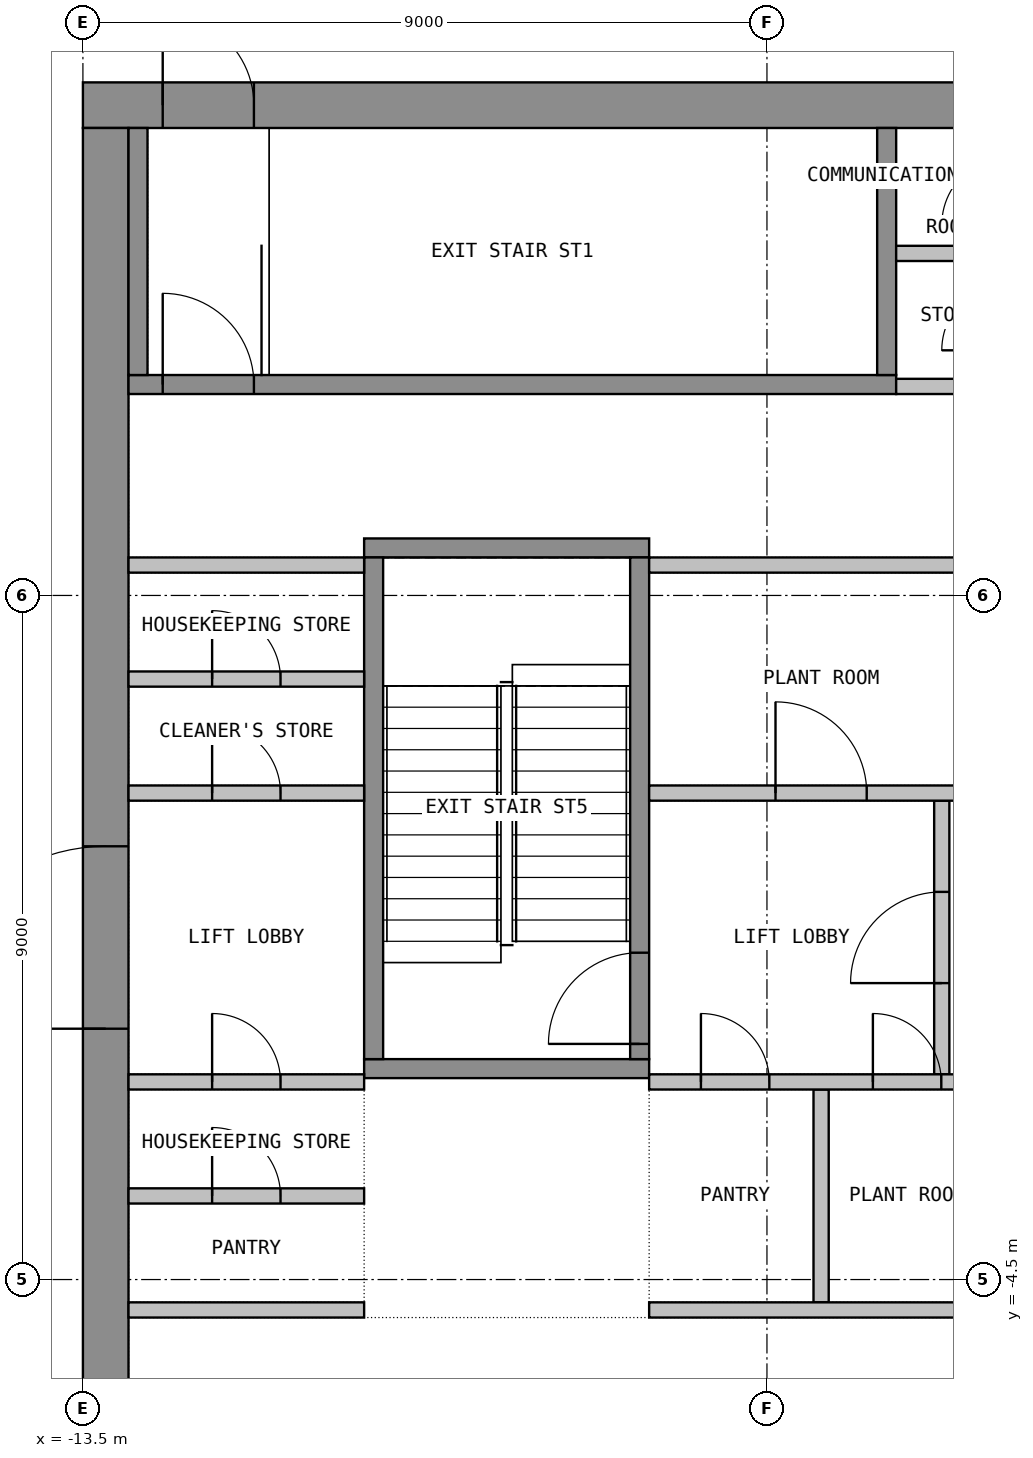
"""IFC4 building model, lengths in metres.
Left out: names, types, materials, properties, quantities, classifications, styles, units other than length and angle.
Written with IfcOpenShell. Run it as: python <this file> out.ifc"""

import sys

from ifc_helpers import new_model, si_unit, direction, frame, frame_2d, origin, place, context, subcontext, project, spatial, rectangle, extrude, element, fill, save


model = new_model("IFC4")
c1 = context("Model", 3, precision=1e-05, world=origin(), true_north=direction((0.0, 1.0)))
c2 = subcontext(c1, "Body", "Model", "MODEL_VIEW")
j1 = project(units=[si_unit("LENGTHUNIT", "METRE"), si_unit("PLANEANGLEUNIT", "RADIAN")], contexts=[c1])
p1 = place(None, origin())
s1 = spatial("IfcSite", under=j1, at=p1, CompositionType="ELEMENT")
p2 = place(p1, origin())
s2 = spatial("IfcBuilding", under=s1, at=p2, CompositionType="ELEMENT")
p3 = place(p2, frame((0.0, 0.0, 318.9)))
s3 = spatial("IfcBuildingStorey", under=s2, at=p3, CompositionType="ELEMENT", Elevation=318.9)
p4 = place(p3, frame((-13.5, 10.95, 0.0), z_axis=(0.0, 0.0, 1.0), x_axis=(1.0, 0.0, 0.0)))
e1 = element("IfcWall", 1, at=p4, inside=s3, PredefinedType="SHEAR", context=c2, shape_type="SweptSolid", body=[
    extrude(rectangle(XDim=27.0, YDim=0.6, at=frame_2d((13.5, 0.0))), origin(), (0.0, 0.0, 1.0), 3.6),
])
p5 = place(p4, frame((12.3, 0.0, 0.0)))
e2 = element("IfcOpeningElement", 2, at=p5, cuts=e1, PredefinedType="OPENING", context=c2, shape_type="SweptSolid", body=[
    extrude(rectangle(XDim=2.4, YDim=2.1, at=frame_2d((1.2, 1.05))), frame((0.0, 0.31, 0.0), z_axis=(0.0, -1.0, 0.0), x_axis=(1.0, 0.0, 0.0)), (0.0, 0.0, 1.0), 0.62),
])
p6 = place(p4, frame((1.05, 0.0, 0.0)))
e3 = element("IfcOpeningElement", 3, at=p6, cuts=e1, PredefinedType="OPENING", context=c2, shape_type="SweptSolid", body=[
    extrude(rectangle(XDim=1.2, YDim=2.1, at=frame_2d((0.6, 1.05))), frame((0.0, 0.31, 0.0), z_axis=(0.0, -1.0, 0.0), x_axis=(1.0, 0.0, 0.0)), (0.0, 0.0, 1.0), 0.62),
])
p7 = place(p4, frame((24.75, 0.0, 0.0)))
e4 = element("IfcOpeningElement", 4, at=p7, cuts=e1, PredefinedType="OPENING", context=c2, shape_type="SweptSolid", body=[
    extrude(rectangle(XDim=1.2, YDim=2.1, at=frame_2d((0.6, 1.05))), frame((0.0, 0.31, 0.0), z_axis=(0.0, -1.0, 0.0), x_axis=(1.0, 0.0, 0.0)), (0.0, 0.0, 1.0), 0.62),
])
p8 = place(p3, frame((-13.2, -10.65, 0.0), z_axis=(0.0, 0.0, 1.0), x_axis=(0.0, 1.0, 0.0)))
e5 = element("IfcWall", 5, at=p8, inside=s3, PredefinedType="SHEAR", context=c2, shape_type="SweptSolid", body=[
    extrude(rectangle(XDim=21.3, YDim=0.6, at=frame_2d((10.65, 0.0))), origin(), (0.0, 0.0, 1.0), 3.6),
])
p9 = place(p8, frame((9.45, 0.0, 0.0)))
e6 = element("IfcOpeningElement", 6, at=p9, cuts=e5, PredefinedType="OPENING", context=c2, shape_type="SweptSolid", body=[
    extrude(rectangle(XDim=2.4, YDim=2.1, at=frame_2d((1.2, 1.05))), frame((0.0, 0.31, 0.0), z_axis=(0.0, -1.0, 0.0), x_axis=(1.0, 0.0, 0.0)), (0.0, 0.0, 1.0), 0.62),
])
p10 = place(p3, frame((-2.2, -1.8, 0.0), z_axis=(0.0, 0.0, 1.0), x_axis=(0.0, 1.0, 0.0)))
e7 = element("IfcWall", 7, at=p10, inside=s3, PredefinedType="PARTITIONING", context=c2, shape_type="SweptSolid", body=[
    extrude(rectangle(XDim=3.6, YDim=0.2, at=frame_2d((1.8, 0.0))), origin(), (0.0, 0.0, 1.0), 3.6),
])
p11 = place(p10, frame((1.2, 0.0, 0.0)))
e8 = element("IfcOpeningElement", 8, at=p11, cuts=e7, PredefinedType="OPENING", context=c2, shape_type="SweptSolid", body=[
    extrude(rectangle(XDim=1.2, YDim=2.1, at=frame_2d((0.6, 1.05))), frame((0.0, 0.11, 0.0), z_axis=(0.0, -1.0, 0.0), x_axis=(1.0, 0.0, 0.0)), (0.0, 0.0, 1.0), 0.22),
])
p12 = place(p3, frame((-12.9, 7.275, 0.0), z_axis=(0.0, 0.0, 1.0), x_axis=(1.0, 0.0, 0.0)))
e9 = element("IfcWall", 9, at=p12, inside=s3, PredefinedType="SHEAR", context=c2, shape_type="SweptSolid", body=[
    extrude(rectangle(XDim=10.1, YDim=0.25, at=frame_2d((5.05, 0.0))), origin(), (0.0, 0.0, 1.0), 3.6),
])
p13 = place(p12, frame((0.45, 0.0, 0.0)))
e10 = element("IfcOpeningElement", 10, at=p13, cuts=e9, PredefinedType="OPENING", context=c2, shape_type="SweptSolid", body=[
    extrude(rectangle(XDim=1.2, YDim=2.1, at=frame_2d((0.6, 1.05))), frame((0.0, 0.135, 0.0), z_axis=(0.0, -1.0, 0.0), x_axis=(1.0, 0.0, 0.0)), (0.0, 0.0, 1.0), 0.27),
])
for number, where, z_axis, x_axis in (
    (11, (-12.775, 7.4, 0.0), (0.0, 0.0, 1.0), (0.0, 1.0, 0.0)),
    (12, (-2.925, 7.4, 0.0), (0.0, 0.0, 1.0), (0.0, 1.0, 0.0)),
):
    element("IfcWall", number, at=place(p3, frame(where, z_axis=z_axis, x_axis=x_axis)), inside=s3, PredefinedType="SHEAR", context=c2, shape_type="SweptSolid", body=[
        extrude(rectangle(XDim=3.25, YDim=0.25, at=frame_2d((1.625, 0.0))), origin(), (0.0, 0.0, 1.0), 3.6),
    ])
for number, where, z_axis, x_axis in (
    (13, (-9.8, -1.725, 0.0), (0.0, 0.0, 1.0), (1.0, 0.0, 0.0)),
    (14, (-9.8, 5.125, 0.0), (0.0, 0.0, 1.0), (1.0, 0.0, 0.0)),
):
    element("IfcWall", number, at=place(p3, frame(where, z_axis=z_axis, x_axis=x_axis)), inside=s3, PredefinedType="SHEAR", context=c2, shape_type="SweptSolid", body=[
        extrude(rectangle(XDim=3.75, YDim=0.25, at=frame_2d((1.875, 0.0))), origin(), (0.0, 0.0, 1.0), 3.6),
    ])
p14 = place(p3, frame((-9.675, -1.6, 0.0), z_axis=(0.0, 0.0, 1.0), x_axis=(0.0, 1.0, 0.0)))
e15 = element("IfcWall", 15, at=p14, inside=s3, PredefinedType="SHEAR", context=c2, shape_type="SweptSolid", body=[
    extrude(rectangle(XDim=6.6, YDim=0.25, at=frame_2d((3.3, 0.0))), origin(), (0.0, 0.0, 1.0), 3.6),
])
p15 = place(p3, frame((-6.175, -1.6, 0.0), z_axis=(0.0, 0.0, 1.0), x_axis=(0.0, 1.0, 0.0)))
e16 = element("IfcWall", 16, at=p15, inside=s3, PredefinedType="SHEAR", context=c2, shape_type="SweptSolid", body=[
    extrude(rectangle(XDim=6.6, YDim=0.25, at=frame_2d((3.3, 0.0))), origin(), (0.0, 0.0, 1.0), 3.6),
])
p16 = place(p15, frame((0.2, 0.0, 0.0)))
e17 = element("IfcOpeningElement", 17, at=p16, cuts=e16, PredefinedType="OPENING", context=c2, shape_type="SweptSolid", body=[
    extrude(rectangle(XDim=1.2, YDim=2.1, at=frame_2d((0.6, 1.05))), frame((0.0, 0.135, 0.0), z_axis=(0.0, -1.0, 0.0), x_axis=(1.0, 0.0, 0.0)), (0.0, 0.0, 1.0), 0.27),
])
for number, where, z_axis, x_axis in (
    (18, (-2.8, 7.25, 0.0), (0.0, 0.0, 1.0), (1.0, 0.0, 0.0)),
    (19, (-2.8, 9.0, 0.0), (0.0, 0.0, 1.0), (1.0, 0.0, 0.0)),
):
    element("IfcWall", number, at=place(p3, frame(where, z_axis=z_axis, x_axis=x_axis)), inside=s3, PredefinedType="PARTITIONING", context=c2, shape_type="SweptSolid", body=[
        extrude(rectangle(XDim=1.4, YDim=0.2, at=frame_2d((0.7, 0.0))), origin(), (0.0, 0.0, 1.0), 3.6),
    ])
p17 = place(p3, frame((-12.9, 3.4, 0.0), z_axis=(0.0, 0.0, 1.0), x_axis=(1.0, 0.0, 0.0)))
e20 = element("IfcWall", 20, at=p17, inside=s3, PredefinedType="PARTITIONING", context=c2, shape_type="SweptSolid", body=[
    extrude(rectangle(XDim=3.1, YDim=0.2, at=frame_2d((1.55, 0.0))), origin(), (0.0, 0.0, 1.0), 3.6),
])
p18 = place(p17, frame((1.1, 0.0, 0.0)))
e21 = element("IfcOpeningElement", 21, at=p18, cuts=e20, PredefinedType="OPENING", context=c2, shape_type="SweptSolid", body=[
    extrude(rectangle(XDim=0.9, YDim=2.1, at=frame_2d((0.45, 1.05))), frame((0.0, 0.11, 0.0), z_axis=(0.0, -1.0, 0.0), x_axis=(1.0, 0.0, 0.0)), (0.0, 0.0, 1.0), 0.22),
])
p19 = place(p3, frame((-12.9, 1.9, 0.0), z_axis=(0.0, 0.0, 1.0), x_axis=(1.0, 0.0, 0.0)))
e22 = element("IfcWall", 22, at=p19, inside=s3, PredefinedType="PARTITIONING", context=c2, shape_type="SweptSolid", body=[
    extrude(rectangle(XDim=3.1, YDim=0.2, at=frame_2d((1.55, 0.0))), origin(), (0.0, 0.0, 1.0), 3.6),
])
p20 = place(p19, frame((1.1, 0.0, 0.0)))
e23 = element("IfcOpeningElement", 23, at=p20, cuts=e22, PredefinedType="OPENING", context=c2, shape_type="SweptSolid", body=[
    extrude(rectangle(XDim=0.9, YDim=2.1, at=frame_2d((0.45, 1.05))), frame((0.0, 0.11, 0.0), z_axis=(0.0, -1.0, 0.0), x_axis=(1.0, 0.0, 0.0)), (0.0, 0.0, 1.0), 0.22),
])
p21 = place(p3, frame((-12.9, 4.9, 0.0), z_axis=(0.0, 0.0, 1.0), x_axis=(1.0, 0.0, 0.0)))
e24 = element("IfcWall", 24, at=p21, inside=s3, PredefinedType="PARTITIONING", context=c2, shape_type="SweptSolid", body=[
    extrude(rectangle(XDim=3.1, YDim=0.2, at=frame_2d((1.55, 0.0))), origin(), (0.0, 0.0, 1.0), 3.6),
])
p22 = place(p3, frame((-6.05, 1.9, 0.0), z_axis=(0.0, 0.0, 1.0), x_axis=(1.0, 0.0, 0.0)))
e25 = element("IfcWall", 25, at=p22, inside=s3, PredefinedType="PARTITIONING", context=c2, shape_type="SweptSolid", body=[
    extrude(rectangle(XDim=4.525, YDim=0.2, at=frame_2d((2.263, 0.0))), origin(), (0.0, 0.0, 1.0), 3.6),
])
p23 = place(p22, frame((1.663, 0.0, 0.0)))
e26 = element("IfcOpeningElement", 26, at=p23, cuts=e25, PredefinedType="OPENING", context=c2, shape_type="SweptSolid", body=[
    extrude(rectangle(XDim=1.2, YDim=2.1, at=frame_2d((0.6, 1.05))), frame((0.0, 0.11, 0.0), z_axis=(0.0, -1.0, 0.0), x_axis=(1.0, 0.0, 0.0)), (0.0, 0.0, 1.0), 0.22),
])
p24 = place(p3, frame((-6.05, 4.9, 0.0), z_axis=(0.0, 0.0, 1.0), x_axis=(1.0, 0.0, 0.0)))
e27 = element("IfcWall", 27, at=p24, inside=s3, PredefinedType="PARTITIONING", context=c2, shape_type="SweptSolid", body=[
    extrude(rectangle(XDim=4.525, YDim=0.2, at=frame_2d((2.263, 0.0))), origin(), (0.0, 0.0, 1.0), 3.6),
])
p25 = place(p3, frame((-12.9, -3.4, 0.0), z_axis=(0.0, 0.0, 1.0), x_axis=(1.0, 0.0, 0.0)))
e28 = element("IfcWall", 28, at=p25, inside=s3, PredefinedType="PARTITIONING", context=c2, shape_type="SweptSolid", body=[
    extrude(rectangle(XDim=3.1, YDim=0.2, at=frame_2d((1.55, 0.0))), origin(), (0.0, 0.0, 1.0), 3.6),
])
p26 = place(p25, frame((1.1, 0.0, 0.0)))
e29 = element("IfcOpeningElement", 29, at=p26, cuts=e28, PredefinedType="OPENING", context=c2, shape_type="SweptSolid", body=[
    extrude(rectangle(XDim=0.9, YDim=2.1, at=frame_2d((0.45, 1.05))), frame((0.0, 0.11, 0.0), z_axis=(0.0, -1.0, 0.0), x_axis=(1.0, 0.0, 0.0)), (0.0, 0.0, 1.0), 0.22),
])
p27 = place(p3, frame((-12.9, -1.9, 0.0), z_axis=(0.0, 0.0, 1.0), x_axis=(1.0, 0.0, 0.0)))
e30 = element("IfcWall", 30, at=p27, inside=s3, PredefinedType="PARTITIONING", context=c2, shape_type="SweptSolid", body=[
    extrude(rectangle(XDim=3.1, YDim=0.2, at=frame_2d((1.55, 0.0))), origin(), (0.0, 0.0, 1.0), 3.6),
])
p28 = place(p27, frame((1.1, 0.0, 0.0)))
e31 = element("IfcOpeningElement", 31, at=p28, cuts=e30, PredefinedType="OPENING", context=c2, shape_type="SweptSolid", body=[
    extrude(rectangle(XDim=0.9, YDim=2.1, at=frame_2d((0.45, 1.05))), frame((0.0, 0.11, 0.0), z_axis=(0.0, -1.0, 0.0), x_axis=(1.0, 0.0, 0.0)), (0.0, 0.0, 1.0), 0.22),
])
p29 = place(p3, frame((-12.9, -4.9, 0.0), z_axis=(0.0, 0.0, 1.0), x_axis=(1.0, 0.0, 0.0)))
e32 = element("IfcWall", 32, at=p29, inside=s3, PredefinedType="PARTITIONING", context=c2, shape_type="SweptSolid", body=[
    extrude(rectangle(XDim=3.1, YDim=0.2, at=frame_2d((1.55, 0.0))), origin(), (0.0, 0.0, 1.0), 3.6),
])
p30 = place(p3, frame((-3.788, -4.8, 0.0), z_axis=(0.0, 0.0, 1.0), x_axis=(0.0, 1.0, 0.0)))
e33 = element("IfcWall", 33, at=p30, inside=s3, PredefinedType="PARTITIONING", context=c2, shape_type="SweptSolid", body=[
    extrude(rectangle(XDim=2.8, YDim=0.2, at=frame_2d((1.4, 0.0))), origin(), (0.0, 0.0, 1.0), 3.6),
])
p31 = place(p3, frame((-6.05, -1.9, 0.0), z_axis=(0.0, 0.0, 1.0), x_axis=(1.0, 0.0, 0.0)))
e34 = element("IfcWall", 34, at=p31, inside=s3, PredefinedType="PARTITIONING", context=c2, shape_type="SweptSolid", body=[
    extrude(rectangle(XDim=4.525, YDim=0.2, at=frame_2d((2.263, 0.0))), origin(), (0.0, 0.0, 1.0), 3.6),
])
p32 = place(p31, frame((0.681, 0.0, 0.0)))
e35 = element("IfcOpeningElement", 35, at=p32, cuts=e34, PredefinedType="OPENING", context=c2, shape_type="SweptSolid", body=[
    extrude(rectangle(XDim=0.9, YDim=2.1, at=frame_2d((0.45, 1.05))), frame((0.0, 0.11, 0.0), z_axis=(0.0, -1.0, 0.0), x_axis=(1.0, 0.0, 0.0)), (0.0, 0.0, 1.0), 0.22),
])
p33 = place(p31, frame((2.944, 0.0, 0.0)))
e36 = element("IfcOpeningElement", 36, at=p33, cuts=e34, PredefinedType="OPENING", context=c2, shape_type="SweptSolid", body=[
    extrude(rectangle(XDim=0.9, YDim=2.1, at=frame_2d((0.45, 1.05))), frame((0.0, 0.11, 0.0), z_axis=(0.0, -1.0, 0.0), x_axis=(1.0, 0.0, 0.0)), (0.0, 0.0, 1.0), 0.22),
])
p34 = place(p3, frame((-6.05, -4.9, 0.0), z_axis=(0.0, 0.0, 1.0), x_axis=(1.0, 0.0, 0.0)))
e37 = element("IfcWall", 37, at=p34, inside=s3, PredefinedType="PARTITIONING", context=c2, shape_type="SweptSolid", body=[
    extrude(rectangle(XDim=4.525, YDim=0.2, at=frame_2d((2.263, 0.0))), origin(), (0.0, 0.0, 1.0), 3.6),
])
p35 = place(p9, origin())
e38 = element("IfcDoor", 38, at=p35, inside=s3, OperationType="DOUBLE_DOOR_DOUBLE_SWING", PredefinedType="DOOR", context=c2, shape_type="SweptSolid", body=[
    extrude(rectangle(XDim=2.4, YDim=2.1, at=frame_2d((1.2, 1.05))), frame((0.0, 0.025, 0.0), z_axis=(0.0, -1.0, 0.0), x_axis=(1.0, 0.0, 0.0)), (0.0, 0.0, 1.0), 0.05),
])
fill(e6, e38)
p36 = place(p6, origin())
e39 = element("IfcDoor", 39, at=p36, inside=s3, OperationType="SINGLE_SWING_RIGHT", PredefinedType="DOOR", context=c2, shape_type="SweptSolid", body=[
    extrude(rectangle(XDim=1.2, YDim=2.1, at=frame_2d((0.6, 1.05))), frame((0.0, 0.025, 0.0), z_axis=(0.0, -1.0, 0.0), x_axis=(1.0, 0.0, 0.0)), (0.0, 0.0, 1.0), 0.05),
])
fill(e3, e39)
p37 = place(p11, origin())
e40 = element("IfcDoor", 40, at=p37, inside=s3, OperationType="SINGLE_SWING_LEFT", PredefinedType="DOOR", context=c2, shape_type="SweptSolid", body=[
    extrude(rectangle(XDim=1.2, YDim=2.1, at=frame_2d((0.6, 1.05))), frame((0.0, 0.025, 0.0), z_axis=(0.0, -1.0, 0.0), x_axis=(1.0, 0.0, 0.0)), (0.0, 0.0, 1.0), 0.05),
])
fill(e8, e40)
p38 = place(p13, origin())
e41 = element("IfcDoor", 41, at=p38, inside=s3, OperationType="SINGLE_SWING_LEFT", PredefinedType="DOOR", context=c2, shape_type="SweptSolid", body=[
    extrude(rectangle(XDim=1.2, YDim=2.1, at=frame_2d((0.6, 1.05))), frame((0.0, 0.025, 0.0), z_axis=(0.0, -1.0, 0.0), x_axis=(1.0, 0.0, 0.0)), (0.0, 0.0, 1.0), 0.05),
])
fill(e10, e41)
p39 = place(p16, origin())
e42 = element("IfcDoor", 42, at=p39, inside=s3, OperationType="SINGLE_SWING_LEFT", PredefinedType="DOOR", context=c2, shape_type="SweptSolid", body=[
    extrude(rectangle(XDim=1.2, YDim=2.1, at=frame_2d((0.6, 1.05))), frame((0.0, 0.025, 0.0), z_axis=(0.0, -1.0, 0.0), x_axis=(1.0, 0.0, 0.0)), (0.0, 0.0, 1.0), 0.05),
])
fill(e17, e42)
p40 = place(p18, origin())
e43 = element("IfcDoor", 43, at=p40, inside=s3, OperationType="SINGLE_SWING_LEFT", PredefinedType="DOOR", context=c2, shape_type="SweptSolid", body=[
    extrude(rectangle(XDim=0.9, YDim=2.1, at=frame_2d((0.45, 1.05))), frame((0.0, 0.025, 0.0), z_axis=(0.0, -1.0, 0.0), x_axis=(1.0, 0.0, 0.0)), (0.0, 0.0, 1.0), 0.05),
])
fill(e21, e43)
p41 = place(p20, origin())
e44 = element("IfcDoor", 44, at=p41, inside=s3, OperationType="SINGLE_SWING_LEFT", PredefinedType="DOOR", context=c2, shape_type="SweptSolid", body=[
    extrude(rectangle(XDim=0.9, YDim=2.1, at=frame_2d((0.45, 1.05))), frame((0.0, 0.025, 0.0), z_axis=(0.0, -1.0, 0.0), x_axis=(1.0, 0.0, 0.0)), (0.0, 0.0, 1.0), 0.05),
])
fill(e23, e44)
p42 = place(p23, origin())
e45 = element("IfcDoor", 45, at=p42, inside=s3, OperationType="SINGLE_SWING_RIGHT", PredefinedType="DOOR", context=c2, shape_type="SweptSolid", body=[
    extrude(rectangle(XDim=1.2, YDim=2.1, at=frame_2d((0.6, 1.05))), frame((0.0, 0.025, 0.0), z_axis=(0.0, -1.0, 0.0), x_axis=(1.0, 0.0, 0.0)), (0.0, 0.0, 1.0), 0.05),
])
fill(e26, e45)
p43 = place(p26, origin())
e46 = element("IfcDoor", 46, at=p43, inside=s3, OperationType="SINGLE_SWING_LEFT", PredefinedType="DOOR", context=c2, shape_type="SweptSolid", body=[
    extrude(rectangle(XDim=0.9, YDim=2.1, at=frame_2d((0.45, 1.05))), frame((0.0, 0.025, 0.0), z_axis=(0.0, -1.0, 0.0), x_axis=(1.0, 0.0, 0.0)), (0.0, 0.0, 1.0), 0.05),
])
fill(e29, e46)
p44 = place(p28, origin())
e47 = element("IfcDoor", 47, at=p44, inside=s3, OperationType="SINGLE_SWING_LEFT", PredefinedType="DOOR", context=c2, shape_type="SweptSolid", body=[
    extrude(rectangle(XDim=0.9, YDim=2.1, at=frame_2d((0.45, 1.05))), frame((0.0, 0.025, 0.0), z_axis=(0.0, -1.0, 0.0), x_axis=(1.0, 0.0, 0.0)), (0.0, 0.0, 1.0), 0.05),
])
fill(e31, e47)
p45 = place(p32, origin())
e48 = element("IfcDoor", 48, at=p45, inside=s3, OperationType="SINGLE_SWING_LEFT", PredefinedType="DOOR", context=c2, shape_type="SweptSolid", body=[
    extrude(rectangle(XDim=0.9, YDim=2.1, at=frame_2d((0.45, 1.05))), frame((0.0, 0.025, 0.0), z_axis=(0.0, -1.0, 0.0), x_axis=(1.0, 0.0, 0.0)), (0.0, 0.0, 1.0), 0.05),
])
fill(e35, e48)
p46 = place(p33, origin())
e49 = element("IfcDoor", 49, at=p46, inside=s3, OperationType="SINGLE_SWING_LEFT", PredefinedType="DOOR", context=c2, shape_type="SweptSolid", body=[
    extrude(rectangle(XDim=0.9, YDim=2.1, at=frame_2d((0.45, 1.05))), frame((0.0, 0.025, 0.0), z_axis=(0.0, -1.0, 0.0), x_axis=(1.0, 0.0, 0.0)), (0.0, 0.0, 1.0), 0.05),
])
fill(e36, e49)
save(model, sys.argv[1])
